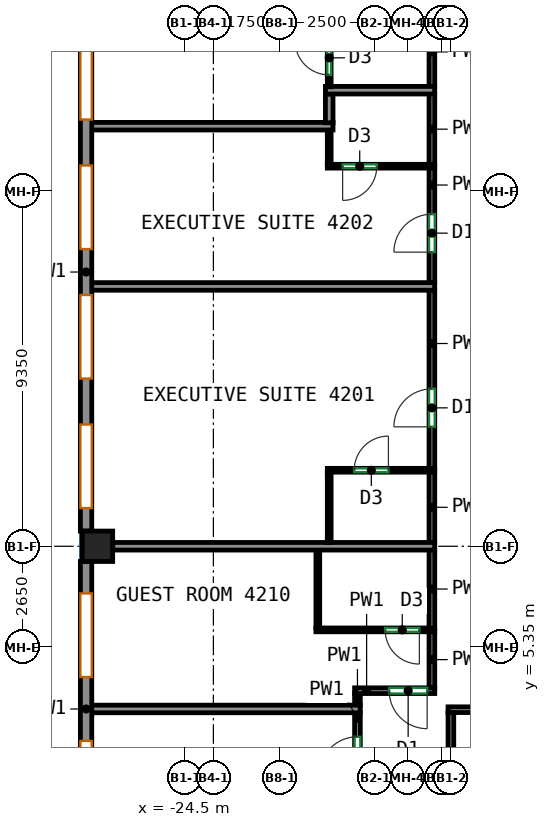
"""IFC4 building model, lengths in metres.
Left out: names, types, materials, properties, quantities, classifications, styles, units other than length and angle.
Written with IfcOpenShell. Run it as: python <this file> out.ifc"""

import sys

from ifc_helpers import new_model, si_unit, direction, frame, frame_2d, origin, origin_2d, place, context, subcontext, project, spatial, rectangle, extrude, source, transform, mapped, element, fill, save


model = new_model("IFC4")
c1 = context("Model", 3, precision=1e-05, world=origin(), true_north=direction((0.0, 1.0)))
c2 = subcontext(c1, "Body", "Model", "MODEL_VIEW")
j1 = project(units=[si_unit("LENGTHUNIT", "METRE"), si_unit("PLANEANGLEUNIT", "RADIAN")], contexts=[c1])
p1 = place(None, origin())
s1 = spatial("IfcSite", under=j1, at=p1, CompositionType="ELEMENT")
p2 = place(p1, origin())
s2 = spatial("IfcBuilding", under=s1, at=p2, CompositionType="ELEMENT")
p3 = place(p2, frame((0.0, 0.0, 178.7)))
s3 = spatial("IfcBuildingStorey", under=s2, at=p3, CompositionType="ELEMENT", Elevation=178.7)
m1 = source(origin(), c2, "Body", "SweptSolid", [
    extrude(rectangle(XDim=0.8, YDim=0.8, at=origin_2d()), origin(), (0.0, 0.0, 1.0), 3.12),
])
p4 = place(p3, frame((-26.8, 8.0, 0.0), z_axis=(0.0, 0.0, 1.0), x_axis=(1.0, 0.0, 0.0)))
e1 = element("IfcColumn", 1, at=p4, inside=s3, PredefinedType="COLUMN", context=c2, shape_type="MappedRepresentation", body=[
    mapped(m1, transform((0.0, 0.0, 0.0))),
])
m2 = source(origin(), c2, "Body", "SweptSolid", [
    extrude(rectangle(XDim=13.632, YDim=0.3, at=frame_2d((6.816, 0.0))), origin(), (0.0, 0.0, 1.0), 3.12),
])
p5 = place(p3, frame((-27.1, 22.032, 0.0), z_axis=(0.0, 0.0, 1.0), x_axis=(0.0, -1.0, 0.0)))
e2 = element("IfcWall", 2, at=p5, inside=s3, PredefinedType="SOLIDWALL", context=c2, shape_type="MappedRepresentation", body=[
    mapped(m2, transform((0.0, 0.0, 0.0))),
])
p6 = place(p5, frame((0.604, 0.0, 0.85)))
e3 = element("IfcOpeningElement", 3, at=p6, cuts=e2, PredefinedType="OPENING", context=c2, shape_type="SweptSolid", body=[
    extrude(rectangle(XDim=2.2, YDim=1.95, at=frame_2d((1.1, 0.975))), frame((0.0, 0.16, 0.0), z_axis=(0.0, -1.0, 0.0), x_axis=(1.0, 0.0, 0.0)), (0.0, 0.0, 1.0), 0.32),
])
p7 = place(p5, frame((4.012, 0.0, 0.85)))
e4 = element("IfcOpeningElement", 4, at=p7, cuts=e2, PredefinedType="OPENING", context=c2, shape_type="SweptSolid", body=[
    extrude(rectangle(XDim=2.2, YDim=1.95, at=frame_2d((1.1, 0.975))), frame((0.0, 0.16, 0.0), z_axis=(0.0, -1.0, 0.0), x_axis=(1.0, 0.0, 0.0)), (0.0, 0.0, 1.0), 0.32),
])
p8 = place(p5, frame((7.42, 0.0, 0.85)))
e5 = element("IfcOpeningElement", 5, at=p8, cuts=e2, PredefinedType="OPENING", context=c2, shape_type="SweptSolid", body=[
    extrude(rectangle(XDim=2.2, YDim=1.95, at=frame_2d((1.1, 0.975))), frame((0.0, 0.16, 0.0), z_axis=(0.0, -1.0, 0.0), x_axis=(1.0, 0.0, 0.0)), (0.0, 0.0, 1.0), 0.32),
])
p9 = place(p5, frame((10.828, 0.0, 0.85)))
e6 = element("IfcOpeningElement", 6, at=p9, cuts=e2, PredefinedType="OPENING", context=c2, shape_type="SweptSolid", body=[
    extrude(rectangle(XDim=2.2, YDim=1.95, at=frame_2d((1.1, 0.975))), frame((0.0, 0.16, 0.0), z_axis=(0.0, -1.0, 0.0), x_axis=(1.0, 0.0, 0.0)), (0.0, 0.0, 1.0), 0.32),
])
m3 = source(origin(), c2, "Body", "SweptSolid", [
    extrude(rectangle(XDim=7.763, YDim=0.3, at=frame_2d((3.881, 0.0))), origin(), (0.0, 0.0, 1.0), 3.12),
])
p10 = place(p3, frame((-27.1, 7.6, 0.0), z_axis=(0.0, 0.0, 1.0), x_axis=(0.0, -1.0, 0.0)))
e7 = element("IfcWall", 7, at=p10, inside=s3, PredefinedType="SOLIDWALL", context=c2, shape_type="MappedRepresentation", body=[
    mapped(m3, transform((0.0, 0.0, 0.0))),
])
p11 = place(p10, frame((0.841, 0.0, 0.85)))
e8 = element("IfcOpeningElement", 8, at=p11, cuts=e7, PredefinedType="OPENING", context=c2, shape_type="SweptSolid", body=[
    extrude(rectangle(XDim=2.2, YDim=1.95, at=frame_2d((1.1, 0.975))), frame((0.0, 0.16, 0.0), z_axis=(0.0, -1.0, 0.0), x_axis=(1.0, 0.0, 0.0)), (0.0, 0.0, 1.0), 0.32),
])
p12 = place(p10, frame((4.722, 0.0, 0.85)))
e9 = element("IfcOpeningElement", 9, at=p12, cuts=e7, PredefinedType="OPENING", context=c2, shape_type="SweptSolid", body=[
    extrude(rectangle(XDim=2.2, YDim=1.95, at=frame_2d((1.1, 0.975))), frame((0.0, 0.16, 0.0), z_axis=(0.0, -1.0, 0.0), x_axis=(1.0, 0.0, 0.0)), (0.0, 0.0, 1.0), 0.32),
])
p13 = place(p3, frame((-19.959, 1.678, 0.0), z_axis=(0.0, 0.0, 1.0), x_axis=(0.0, 1.0, 0.0)))
e10 = element("IfcWall", 10, at=p13, inside=s3, PredefinedType="PARTITIONING", context=c2, shape_type="SweptSolid", body=[
    extrude(rectangle(XDim=1.951, YDim=0.15, at=frame_2d((0.976, 0.0))), origin(), (0.0, 0.0, 1.0), 3.12),
])
p14 = place(p13, frame((0.31, 0.0, 0.0)))
e11 = element("IfcOpeningElement", 11, at=p14, cuts=e10, PredefinedType="OPENING", context=c2, shape_type="SweptSolid", body=[
    extrude(rectangle(XDim=1.0, YDim=2.1, at=frame_2d((0.5, 1.05))), frame((0.0, 0.085, 0.0), z_axis=(0.0, -1.0, 0.0), x_axis=(1.0, 0.0, 0.0)), (0.0, 0.0, 1.0), 0.17),
])
p15 = place(p3, frame((-19.959, 3.809, 0.0), z_axis=(0.0, 0.0, 1.0), x_axis=(0.0, 1.0, 0.0)))
e12 = element("IfcWall", 12, at=p15, inside=s3, PredefinedType="PARTITIONING", context=c2, shape_type="SweptSolid", body=[
    extrude(rectangle(XDim=0.316, YDim=0.15, at=frame_2d((0.158, 0.0))), origin(), (0.0, 0.0, 1.0), 3.12),
])
p16 = place(p3, frame((-17.925, 4.2, 0.0), z_axis=(0.0, 0.0, 1.0), x_axis=(-1.0, 0.0, 0.0)))
e13 = element("IfcWall", 13, at=p16, inside=s3, PredefinedType="PARTITIONING", context=c2, shape_type="SweptSolid", body=[
    extrude(rectangle(XDim=2.109, YDim=0.15, at=frame_2d((1.054, 0.0))), origin(), (0.0, 0.0, 1.0), 3.12),
])
p17 = place(p16, frame((0.2, 0.0, 0.0)))
e14 = element("IfcOpeningElement", 14, at=p17, cuts=e13, PredefinedType="OPENING", context=c2, shape_type="SweptSolid", body=[
    extrude(rectangle(XDim=1.0, YDim=2.1, at=frame_2d((0.5, 1.05))), frame((0.0, 0.085, 0.0), z_axis=(0.0, -1.0, 0.0), x_axis=(1.0, 0.0, 0.0)), (0.0, 0.0, 1.0), 0.17),
])
p18 = place(p3, frame((-18.0, 4.275, 0.0), z_axis=(0.0, 0.0, 1.0), x_axis=(0.0, 1.0, 0.0)))
e15 = element("IfcWall", 15, at=p18, inside=s3, PredefinedType="PARTITIONING", context=c2, shape_type="SweptSolid", body=[
    extrude(rectangle(XDim=1.485, YDim=0.15, at=frame_2d((0.743, 0.0))), origin(), (0.0, 0.0, 1.0), 3.12),
])
p19 = place(p3, frame((-18.0, 5.84, 0.0), z_axis=(0.0, 0.0, 1.0), x_axis=(0.0, 1.0, 0.0)))
e16 = element("IfcWall", 16, at=p19, inside=s3, PredefinedType="PARTITIONING", context=c2, shape_type="SweptSolid", body=[
    extrude(rectangle(XDim=2.07, YDim=0.15, at=frame_2d((1.035, 0.0))), origin(), (0.0, 0.0, 1.0), 3.12),
])
p20 = place(p3, frame((-18.0, 10.04, 0.0), z_axis=(0.0, 0.0, 1.0), x_axis=(0.0, 1.0, 0.0)))
e17 = element("IfcWall", 17, at=p20, inside=s3, PredefinedType="PARTITIONING", context=c2, shape_type="SweptSolid", body=[
    extrude(rectangle(XDim=4.707, YDim=0.15, at=frame_2d((2.354, 0.0))), origin(), (0.0, 0.0, 1.0), 3.12),
])
p21 = place(p20, frame((1.102, 0.0, 0.0)))
e18 = element("IfcOpeningElement", 18, at=p21, cuts=e17, PredefinedType="OPENING", context=c2, shape_type="SweptSolid", body=[
    extrude(rectangle(XDim=1.0, YDim=2.1, at=frame_2d((0.5, 1.05))), frame((0.0, 0.085, 0.0), z_axis=(0.0, -1.0, 0.0), x_axis=(1.0, 0.0, 0.0)), (0.0, 0.0, 1.0), 0.17),
])
p22 = place(p3, frame((-18.0, 8.09, 0.0), z_axis=(0.0, 0.0, 1.0), x_axis=(0.0, 1.0, 0.0)))
e19 = element("IfcWall", 19, at=p22, inside=s3, PredefinedType="PARTITIONING", context=c2, shape_type="SweptSolid", body=[
    extrude(rectangle(XDim=1.87, YDim=0.15, at=frame_2d((0.935, 0.0))), origin(), (0.0, 0.0, 1.0), 3.12),
])
p23 = place(p3, frame((-18.0, 14.927, 0.0), z_axis=(0.0, 0.0, 1.0), x_axis=(0.0, 1.0, 0.0)))
e20 = element("IfcWall", 20, at=p23, inside=s3, PredefinedType="PARTITIONING", context=c2, shape_type="SweptSolid", body=[
    extrude(rectangle(XDim=3.033, YDim=0.15, at=frame_2d((1.517, 0.0))), origin(), (0.0, 0.0, 1.0), 3.12),
])
p24 = place(p23, frame((0.812, 0.0, 0.0)))
e21 = element("IfcOpeningElement", 21, at=p24, cuts=e20, PredefinedType="OPENING", context=c2, shape_type="SweptSolid", body=[
    extrude(rectangle(XDim=1.0, YDim=2.1, at=frame_2d((0.5, 1.05))), frame((0.0, 0.085, 0.0), z_axis=(0.0, -1.0, 0.0), x_axis=(1.0, 0.0, 0.0)), (0.0, 0.0, 1.0), 0.17),
])
p25 = place(p3, frame((-18.0, 18.04, 0.0), z_axis=(0.0, 0.0, 1.0), x_axis=(0.0, 1.0, 0.0)))
e22 = element("IfcWall", 22, at=p25, inside=s3, PredefinedType="PARTITIONING", context=c2, shape_type="SweptSolid", body=[
    extrude(rectangle(XDim=1.87, YDim=0.15, at=frame_2d((0.935, 0.0))), origin(), (0.0, 0.0, 1.0), 3.12),
])
p26 = place(p3, frame((-18.0, 20.09, 0.0), z_axis=(0.0, 0.0, 1.0), x_axis=(0.0, 1.0, 0.0)))
e23 = element("IfcWall", 23, at=p26, inside=s3, PredefinedType="PARTITIONING", context=c2, shape_type="SweptSolid", body=[
    extrude(rectangle(XDim=1.835, YDim=0.15, at=frame_2d((0.917, 0.0))), origin(), (0.0, 0.0, 1.0), 3.12),
])
p27 = place(p3, frame((-17.575, 3.7, 0.0), z_axis=(0.0, 0.0, 1.0), x_axis=(1.0, 0.0, 0.0)))
e24 = element("IfcWall", 24, at=p27, inside=s3, PredefinedType="PARTITIONING", context=c2, shape_type="SweptSolid", body=[
    extrude(rectangle(XDim=33.85, YDim=0.15, at=frame_2d((16.925, 0.0))), origin(), (0.0, 0.0, 1.0), 3.12),
])
p28 = place(p27, frame((4.201, 0.0, 0.0)))
e25 = element("IfcOpeningElement", 25, at=p28, cuts=e24, PredefinedType="OPENING", context=c2, shape_type="SweptSolid", body=[
    extrude(rectangle(XDim=0.9, YDim=2.1, at=frame_2d((0.45, 1.05))), frame((0.0, 0.085, 0.0), z_axis=(0.0, -1.0, 0.0), x_axis=(1.0, 0.0, 0.0)), (0.0, 0.0, 1.0), 0.17),
])
p29 = place(p27, frame((13.22, 0.0, 0.0)))
e26 = element("IfcOpeningElement", 26, at=p29, cuts=e24, PredefinedType="OPENING", context=c2, shape_type="SweptSolid", body=[
    extrude(rectangle(XDim=0.9, YDim=2.1, at=frame_2d((0.45, 1.05))), frame((0.0, 0.085, 0.0), z_axis=(0.0, -1.0, 0.0), x_axis=(1.0, 0.0, 0.0)), (0.0, 0.0, 1.0), 0.17),
])
p30 = place(p27, frame((23.959, 0.0, 0.0)))
e27 = element("IfcOpeningElement", 27, at=p30, cuts=e24, PredefinedType="OPENING", context=c2, shape_type="SweptSolid", body=[
    extrude(rectangle(XDim=0.9, YDim=2.1, at=frame_2d((0.45, 1.05))), frame((0.0, 0.085, 0.0), z_axis=(0.0, -1.0, 0.0), x_axis=(1.0, 0.0, 0.0)), (0.0, 0.0, 1.0), 0.17),
])
p31 = place(p3, frame((-17.5, -4.725, 0.0), z_axis=(0.0, 0.0, 1.0), x_axis=(0.0, 1.0, 0.0)))
e28 = element("IfcWall", 28, at=p31, inside=s3, PredefinedType="PARTITIONING", context=c2, shape_type="SweptSolid", body=[
    extrude(rectangle(XDim=8.35, YDim=0.15, at=frame_2d((4.175, 0.0))), origin(), (0.0, 0.0, 1.0), 3.12),
])
p32 = place(p3, frame((-27.0, 3.719, 0.0), z_axis=(0.0, 0.0, 1.0), x_axis=(1.0, 0.0, 0.0)))
e29 = element("IfcWall", 29, at=p32, inside=s3, PredefinedType="PARTITIONING", context=c2, shape_type="SweptSolid", body=[
    extrude(rectangle(XDim=7.114, YDim=0.2, at=frame_2d((3.557, 0.0))), origin(), (0.0, 0.0, 1.0), 3.12),
])
p33 = place(p3, frame((-17.927, 5.8, 0.0), z_axis=(0.0, 0.0, 1.0), x_axis=(-1.0, 0.0, 0.0)))
e30 = element("IfcWall", 30, at=p33, inside=s3, PredefinedType="PARTITIONING", context=c2, shape_type="SweptSolid", body=[
    extrude(rectangle(XDim=3.125, YDim=0.1, at=frame_2d((1.562, 0.0))), origin(), (0.0, 0.0, 1.0), 3.12),
])
p34 = place(p33, frame((0.403, 0.0, 0.0)))
e31 = element("IfcOpeningElement", 31, at=p34, cuts=e30, PredefinedType="OPENING", context=c2, shape_type="SweptSolid", body=[
    extrude(rectangle(XDim=0.9, YDim=2.1, at=frame_2d((0.45, 1.05))), frame((0.0, 0.06, 0.0), z_axis=(0.0, -1.0, 0.0), x_axis=(1.0, 0.0, 0.0)), (0.0, 0.0, 1.0), 0.12),
])
p35 = place(p3, frame((-21.002, 5.85, 0.0), z_axis=(0.0, 0.0, 1.0), x_axis=(0.0, 1.0, 0.0)))
e32 = element("IfcWall", 32, at=p35, inside=s3, PredefinedType="PARTITIONING", context=c2, shape_type="SweptSolid", body=[
    extrude(rectangle(XDim=2.05, YDim=0.1, at=frame_2d((1.025, 0.0))), origin(), (0.0, 0.0, 1.0), 3.12),
])
p36 = place(p3, frame((-26.4, 8.0, 0.0), z_axis=(0.0, 0.0, 1.0), x_axis=(1.0, 0.0, 0.0)))
e33 = element("IfcWall", 33, at=p36, inside=s3, PredefinedType="PARTITIONING", context=c2, shape_type="SweptSolid", body=[
    extrude(rectangle(XDim=8.473, YDim=0.2, at=frame_2d((4.236, 0.0))), origin(), (0.0, 0.0, 1.0), 3.12),
])
p37 = place(p3, frame((-20.752, 10.0, 0.0), z_axis=(0.0, 0.0, 1.0), x_axis=(1.0, 0.0, 0.0)))
e34 = element("IfcWall", 34, at=p37, inside=s3, PredefinedType="PARTITIONING", context=c2, shape_type="SweptSolid", body=[
    extrude(rectangle(XDim=2.825, YDim=0.1, at=frame_2d((1.413, 0.0))), origin(), (0.0, 0.0, 1.0), 3.12),
])
p38 = place(p37, frame((0.708, 0.0, 0.0)))
e35 = element("IfcOpeningElement", 35, at=p38, cuts=e34, PredefinedType="OPENING", context=c2, shape_type="SweptSolid", body=[
    extrude(rectangle(XDim=0.9, YDim=2.1, at=frame_2d((0.45, 1.05))), frame((0.0, 0.06, 0.0), z_axis=(0.0, -1.0, 0.0), x_axis=(1.0, 0.0, 0.0)), (0.0, 0.0, 1.0), 0.12),
])
p39 = place(p3, frame((-20.702, 8.1, 0.0), z_axis=(0.0, 0.0, 1.0), x_axis=(0.0, 1.0, 0.0)))
e36 = element("IfcWall", 36, at=p39, inside=s3, PredefinedType="PARTITIONING", context=c2, shape_type="SweptSolid", body=[
    extrude(rectangle(XDim=1.85, YDim=0.1, at=frame_2d((0.925, 0.0))), origin(), (0.0, 0.0, 1.0), 3.12),
])
p40 = place(p3, frame((-17.927, 14.837, 0.0), z_axis=(0.0, 0.0, 1.0), x_axis=(-1.0, 0.0, 0.0)))
e37 = element("IfcWall", 37, at=p40, inside=s3, PredefinedType="PARTITIONING", context=c2, shape_type="SweptSolid", body=[
    extrude(rectangle(XDim=9.073, YDim=0.2, at=frame_2d((4.537, 0.0))), origin(), (0.0, 0.0, 1.0), 3.12),
])
p41 = place(p3, frame((-17.927, 18.0, 0.0), z_axis=(0.0, 0.0, 1.0), x_axis=(-1.0, 0.0, 0.0)))
e38 = element("IfcWall", 38, at=p41, inside=s3, PredefinedType="PARTITIONING", context=c2, shape_type="SweptSolid", body=[
    extrude(rectangle(XDim=2.825, YDim=0.1, at=frame_2d((1.413, 0.0))), origin(), (0.0, 0.0, 1.0), 3.12),
])
p42 = place(p41, frame((1.522, 0.0, 0.0)))
e39 = element("IfcOpeningElement", 39, at=p42, cuts=e38, PredefinedType="OPENING", context=c2, shape_type="SweptSolid", body=[
    extrude(rectangle(XDim=0.9, YDim=2.1, at=frame_2d((0.45, 1.05))), frame((0.0, 0.06, 0.0), z_axis=(0.0, -1.0, 0.0), x_axis=(1.0, 0.0, 0.0)), (0.0, 0.0, 1.0), 0.12),
])
p43 = place(p3, frame((-20.702, 18.05, 0.0), z_axis=(0.0, 0.0, 1.0), x_axis=(0.0, 1.0, 0.0)))
e40 = element("IfcWall", 40, at=p43, inside=s3, PredefinedType="PARTITIONING", context=c2, shape_type="SweptSolid", body=[
    extrude(rectangle(XDim=0.903, YDim=0.1, at=frame_2d((0.451, 0.0))), origin(), (0.0, 0.0, 1.0), 3.12),
])
p44 = place(p3, frame((-20.602, 19.053, 0.0), z_axis=(0.0, 0.0, 1.0), x_axis=(-1.0, 0.0, 0.0)))
e41 = element("IfcWall", 41, at=p44, inside=s3, PredefinedType="PARTITIONING", context=c2, shape_type="SweptSolid", body=[
    extrude(rectangle(XDim=6.398, YDim=0.2, at=frame_2d((3.199, 0.0))), origin(), (0.0, 0.0, 1.0), 3.12),
])
p45 = place(p3, frame((-20.702, 19.9, 0.0), z_axis=(0.0, 0.0, 1.0), x_axis=(0.0, -1.0, 0.0)))
e42 = element("IfcWall", 42, at=p45, inside=s3, PredefinedType="PARTITIONING", context=c2, shape_type="SweptSolid", body=[
    extrude(rectangle(XDim=0.757, YDim=0.2, at=frame_2d((0.378, 0.0))), origin(), (0.0, 0.0, 1.0), 3.12),
])
p46 = place(p3, frame((-17.927, 20.0, 0.0), z_axis=(0.0, 0.0, 1.0), x_axis=(-1.0, 0.0, 0.0)))
e43 = element("IfcWall", 43, at=p46, inside=s3, PredefinedType="PARTITIONING", context=c2, shape_type="SweptSolid", body=[
    extrude(rectangle(XDim=2.875, YDim=0.2, at=frame_2d((1.438, 0.0))), origin(), (0.0, 0.0, 1.0), 3.12),
])
p47 = place(p3, frame((-20.702, 20.09, 0.0), z_axis=(0.0, 0.0, 1.0), x_axis=(0.0, 1.0, 0.0)))
e44 = element("IfcWall", 44, at=p47, inside=s3, PredefinedType="PARTITIONING", context=c2, shape_type="SweptSolid", body=[
    extrude(rectangle(XDim=1.86, YDim=0.1, at=frame_2d((0.93, 0.0))), origin(), (0.0, 0.0, 1.0), 3.12),
])
p48 = place(p47, frame((0.312, 0.0, 0.0)))
e45 = element("IfcOpeningElement", 45, at=p48, cuts=e44, PredefinedType="OPENING", context=c2, shape_type="SweptSolid", body=[
    extrude(rectangle(XDim=0.9, YDim=2.1, at=frame_2d((0.45, 1.05))), frame((0.0, 0.06, 0.0), z_axis=(0.0, -1.0, 0.0), x_axis=(1.0, 0.0, 0.0)), (0.0, 0.0, 1.0), 0.12),
])
p49 = place(p6, origin())
e46 = element("IfcWindow", 46, at=p49, inside=s3, PartitioningType="SINGLE_PANEL", PredefinedType="WINDOW", context=c2, shape_type="SweptSolid", body=[
    extrude(rectangle(XDim=2.2, YDim=1.95, at=frame_2d((1.1, 0.975))), frame((0.0, 0.03, 0.0), z_axis=(0.0, -1.0, 0.0), x_axis=(1.0, 0.0, 0.0)), (0.0, 0.0, 1.0), 0.06),
])
fill(e3, e46)
p50 = place(p7, origin())
e47 = element("IfcWindow", 47, at=p50, inside=s3, PartitioningType="SINGLE_PANEL", PredefinedType="WINDOW", context=c2, shape_type="SweptSolid", body=[
    extrude(rectangle(XDim=2.2, YDim=1.95, at=frame_2d((1.1, 0.975))), frame((0.0, 0.03, 0.0), z_axis=(0.0, -1.0, 0.0), x_axis=(1.0, 0.0, 0.0)), (0.0, 0.0, 1.0), 0.06),
])
fill(e4, e47)
p51 = place(p8, origin())
e48 = element("IfcWindow", 48, at=p51, inside=s3, PartitioningType="SINGLE_PANEL", PredefinedType="WINDOW", context=c2, shape_type="SweptSolid", body=[
    extrude(rectangle(XDim=2.2, YDim=1.95, at=frame_2d((1.1, 0.975))), frame((0.0, 0.03, 0.0), z_axis=(0.0, -1.0, 0.0), x_axis=(1.0, 0.0, 0.0)), (0.0, 0.0, 1.0), 0.06),
])
fill(e5, e48)
p52 = place(p9, origin())
e49 = element("IfcWindow", 49, at=p52, inside=s3, PartitioningType="SINGLE_PANEL", PredefinedType="WINDOW", context=c2, shape_type="SweptSolid", body=[
    extrude(rectangle(XDim=2.2, YDim=1.95, at=frame_2d((1.1, 0.975))), frame((0.0, 0.03, 0.0), z_axis=(0.0, -1.0, 0.0), x_axis=(1.0, 0.0, 0.0)), (0.0, 0.0, 1.0), 0.06),
])
fill(e6, e49)
p53 = place(p11, origin())
e50 = element("IfcWindow", 50, at=p53, inside=s3, PartitioningType="SINGLE_PANEL", PredefinedType="WINDOW", context=c2, shape_type="SweptSolid", body=[
    extrude(rectangle(XDim=2.2, YDim=1.95, at=frame_2d((1.1, 0.975))), frame((0.0, 0.03, 0.0), z_axis=(0.0, -1.0, 0.0), x_axis=(1.0, 0.0, 0.0)), (0.0, 0.0, 1.0), 0.06),
])
fill(e8, e50)
p54 = place(p12, origin())
e51 = element("IfcWindow", 51, at=p54, inside=s3, PartitioningType="SINGLE_PANEL", PredefinedType="WINDOW", context=c2, shape_type="SweptSolid", body=[
    extrude(rectangle(XDim=2.2, YDim=1.95, at=frame_2d((1.1, 0.975))), frame((0.0, 0.03, 0.0), z_axis=(0.0, -1.0, 0.0), x_axis=(1.0, 0.0, 0.0)), (0.0, 0.0, 1.0), 0.06),
])
fill(e9, e51)
p55 = place(p14, origin())
e52 = element("IfcDoor", 52, at=p55, inside=s3, OperationType="SINGLE_SWING_LEFT", PredefinedType="DOOR", context=c2, shape_type="SweptSolid", body=[
    extrude(rectangle(XDim=1.0, YDim=2.1, at=frame_2d((0.5, 1.05))), frame((0.0, 0.025, 0.0), z_axis=(0.0, -1.0, 0.0), x_axis=(1.0, 0.0, 0.0)), (0.0, 0.0, 1.0), 0.05),
])
fill(e11, e52)
p56 = place(p17, origin())
e53 = element("IfcDoor", 53, at=p56, inside=s3, OperationType="SINGLE_SWING_LEFT", PredefinedType="DOOR", context=c2, shape_type="SweptSolid", body=[
    extrude(rectangle(XDim=1.0, YDim=2.1, at=frame_2d((0.5, 1.05))), frame((0.0, 0.025, 0.0), z_axis=(0.0, -1.0, 0.0), x_axis=(1.0, 0.0, 0.0)), (0.0, 0.0, 1.0), 0.05),
])
fill(e14, e53)
p57 = place(p34, origin())
e54 = element("IfcDoor", 54, at=p57, inside=s3, OperationType="SINGLE_SWING_LEFT", PredefinedType="DOOR", context=c2, shape_type="SweptSolid", body=[
    extrude(rectangle(XDim=0.9, YDim=2.1, at=frame_2d((0.45, 1.05))), frame((0.0, 0.025, 0.0), z_axis=(0.0, -1.0, 0.0), x_axis=(1.0, 0.0, 0.0)), (0.0, 0.0, 1.0), 0.05),
])
fill(e31, e54)
p58 = place(p38, origin())
e55 = element("IfcDoor", 55, at=p58, inside=s3, OperationType="SINGLE_SWING_RIGHT", PredefinedType="DOOR", context=c2, shape_type="SweptSolid", body=[
    extrude(rectangle(XDim=0.9, YDim=2.1, at=frame_2d((0.45, 1.05))), frame((0.0, 0.025, 0.0), z_axis=(0.0, -1.0, 0.0), x_axis=(1.0, 0.0, 0.0)), (0.0, 0.0, 1.0), 0.05),
])
fill(e35, e55)
p59 = place(p21, origin())
e56 = element("IfcDoor", 56, at=p59, inside=s3, OperationType="SINGLE_SWING_LEFT", PredefinedType="DOOR", context=c2, shape_type="SweptSolid", body=[
    extrude(rectangle(XDim=1.0, YDim=2.1, at=frame_2d((0.5, 1.05))), frame((0.0, 0.025, 0.0), z_axis=(0.0, -1.0, 0.0), x_axis=(1.0, 0.0, 0.0)), (0.0, 0.0, 1.0), 0.05),
])
fill(e18, e56)
p60 = place(p24, origin())
e57 = element("IfcDoor", 57, at=p60, inside=s3, OperationType="SINGLE_SWING_LEFT", PredefinedType="DOOR", context=c2, shape_type="SweptSolid", body=[
    extrude(rectangle(XDim=1.0, YDim=2.1, at=frame_2d((0.5, 1.05))), frame((0.0, 0.025, 0.0), z_axis=(0.0, -1.0, 0.0), x_axis=(1.0, 0.0, 0.0)), (0.0, 0.0, 1.0), 0.05),
])
fill(e21, e57)
p61 = place(p42, origin())
e58 = element("IfcDoor", 58, at=p61, inside=s3, OperationType="SINGLE_SWING_RIGHT", PredefinedType="DOOR", context=c2, shape_type="SweptSolid", body=[
    extrude(rectangle(XDim=0.9, YDim=2.1, at=frame_2d((0.45, 1.05))), frame((0.0, 0.025, 0.0), z_axis=(0.0, -1.0, 0.0), x_axis=(1.0, 0.0, 0.0)), (0.0, 0.0, 1.0), 0.05),
])
fill(e39, e58)
p62 = place(p48, origin())
e59 = element("IfcDoor", 59, at=p62, inside=s3, OperationType="SINGLE_SWING_RIGHT", PredefinedType="DOOR", context=c2, shape_type="SweptSolid", body=[
    extrude(rectangle(XDim=0.9, YDim=2.1, at=frame_2d((0.45, 1.05))), frame((0.0, 0.025, 0.0), z_axis=(0.0, -1.0, 0.0), x_axis=(1.0, 0.0, 0.0)), (0.0, 0.0, 1.0), 0.05),
])
fill(e45, e59)
save(model, sys.argv[1])
